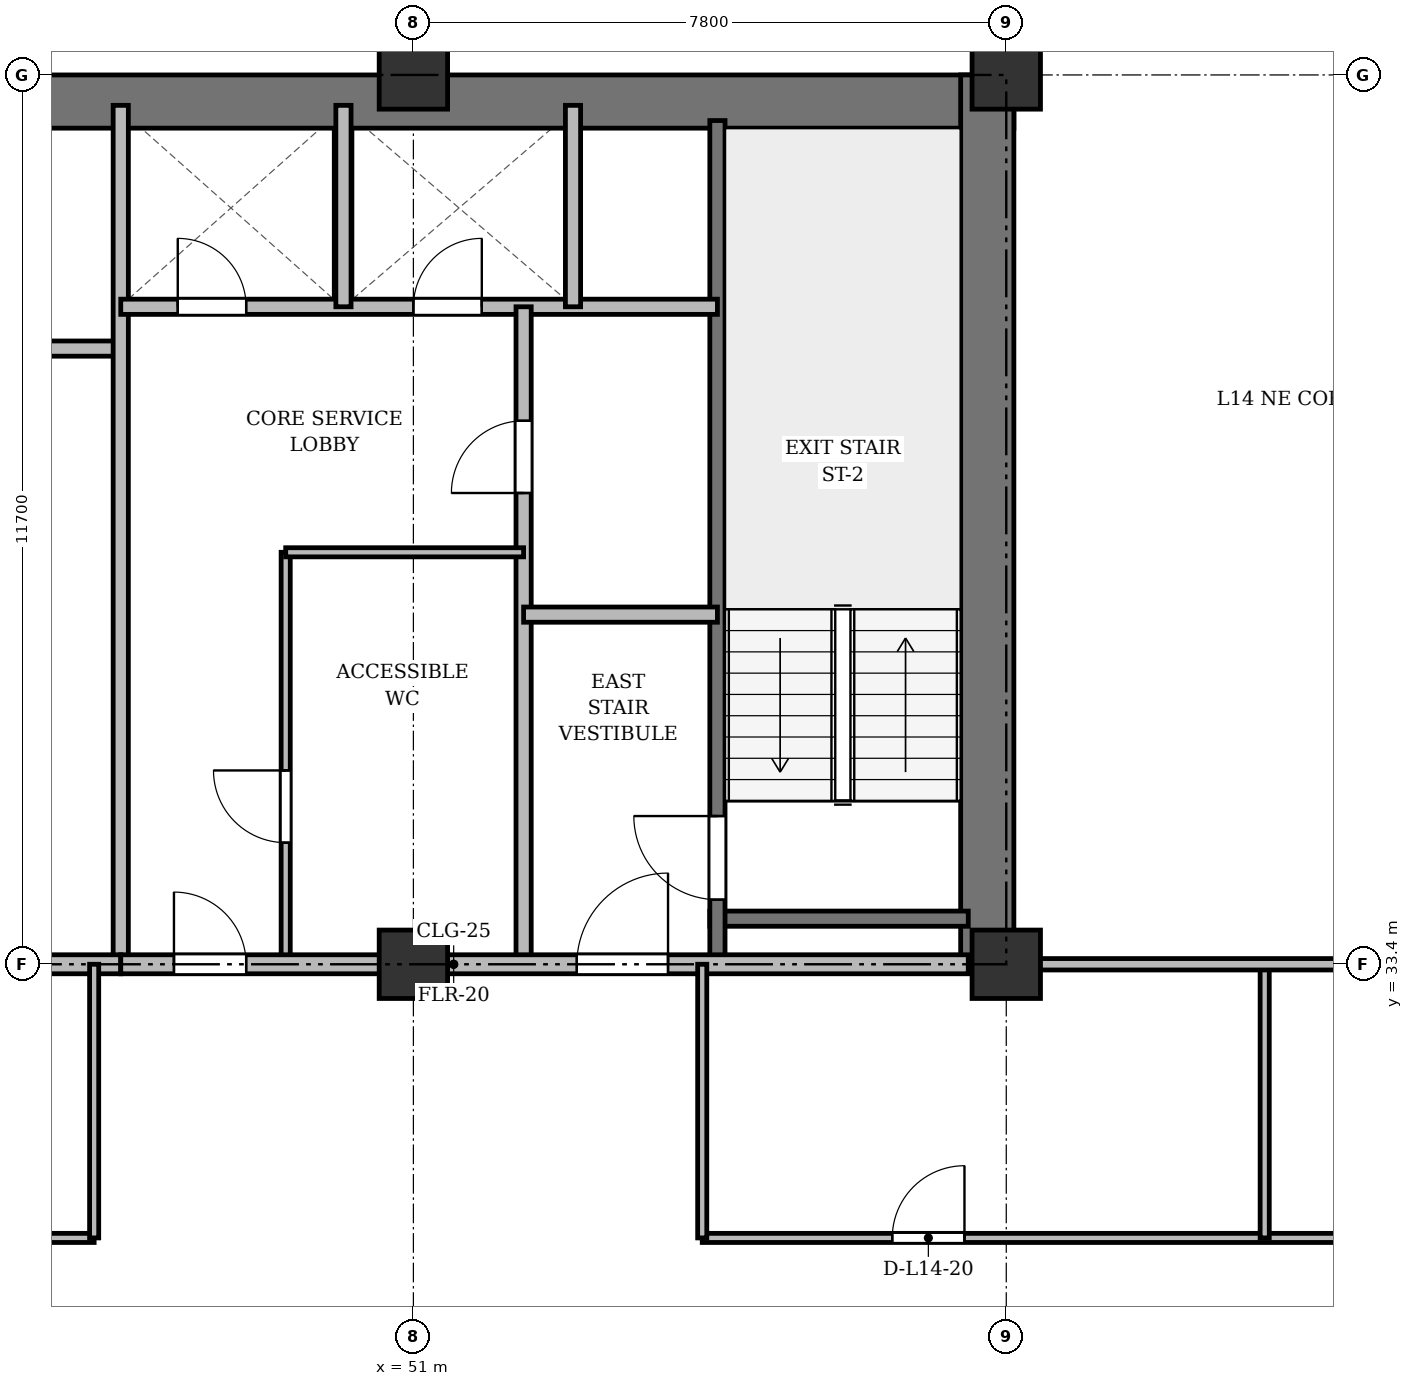
"""IFC4 building model, lengths in metres.
Left out: names, types, materials, properties, quantities, classifications, styles, units other than length and angle.
Written with IfcOpenShell. Run it as: python <this file> out.ifc"""

import sys

from ifc_helpers import new_model, si_unit, direction, frame, frame_2d, origin, origin_2d, place, context, subcontext, project, spatial, rectangle, extrude, source, transform, mapped, element, fill, save


model = new_model("IFC4")
c1 = context("Model", 3, precision=1e-05, world=origin(), true_north=direction((0.0, 1.0)))
c2 = subcontext(c1, "Body", "Model", "MODEL_VIEW")
j1 = project(units=[si_unit("LENGTHUNIT", "METRE"), si_unit("PLANEANGLEUNIT", "RADIAN")], contexts=[c1])
p1 = place(None, origin())
s1 = spatial("IfcSite", under=j1, at=p1, CompositionType="ELEMENT")
p2 = place(p1, origin())
s2 = spatial("IfcBuilding", under=s1, at=p2, CompositionType="ELEMENT")
p3 = place(p2, frame((0.0, 0.0, 55.9)))
s3 = spatial("IfcBuildingStorey", under=s2, at=p3, CompositionType="ELEMENT", Elevation=55.9)
m1 = source(origin(), c2, "Body", "SweptSolid", [
    extrude(rectangle(XDim=0.9, YDim=0.9, at=origin_2d()), origin(), (0.0, 0.0, 1.0), 3.6),
])
for number, where, z_axis, x_axis in (
    (1, (51.0, 33.4, 0.0), (0.0, 0.0, 1.0), (1.0, 0.0, 0.0)),
    (2, (51.0, 45.1, 0.0), (0.0, 0.0, 1.0), (1.0, 0.0, 0.0)),
    (3, (58.8, 33.4, 0.0), (0.0, 0.0, 1.0), (1.0, 0.0, 0.0)),
    (4, (58.8, 45.1, 0.0), (0.0, 0.0, 1.0), (1.0, 0.0, 0.0)),
):
    element("IfcColumn", number, at=place(p3, frame(where, z_axis=z_axis, x_axis=x_axis)), inside=s3, PredefinedType="COLUMN", context=c2, shape_type="MappedRepresentation", body=[
        mapped(m1, transform((0.0, 0.0, 0.0), x_axis=(1.0, 0.0, 0.0), y_axis=(0.0, 1.0, 0.0), z_axis=(0.0, 0.0, 1.0), scale=1.0)),
    ])
p4 = place(p3, frame((15.5, 44.75, 0.0), z_axis=(0.0, 0.0, 1.0), x_axis=(1.0, 0.0, 0.0)))
e5 = element("IfcWall", 5, at=p4, inside=s3, PredefinedType="SHEAR", context=c2, shape_type="SweptSolid", body=[
    extrude(rectangle(XDim=43.4, YDim=0.7, at=frame_2d((21.7, 0.0))), origin(), (0.0, 0.0, 1.0), 3.34),
])
p5 = place(p3, frame((58.55, 33.4, 0.0), z_axis=(0.0, 0.0, 1.0), x_axis=(0.0, 1.0, 0.0)))
e6 = element("IfcWall", 6, at=p5, inside=s3, PredefinedType="SHEAR", context=c2, shape_type="SweptSolid", body=[
    extrude(rectangle(XDim=11.7, YDim=0.7, at=frame_2d((5.85, 0.0))), origin(), (0.0, 0.0, 1.0), 3.34),
])
p6 = place(p3, frame((54.9, 34.0, 0.0), z_axis=(0.0, 0.0, 1.0), x_axis=(1.0, 0.0, 0.0)))
e7 = element("IfcWall", 7, at=p6, inside=s3, PredefinedType="SHEAR", context=c2, shape_type="SweptSolid", body=[
    extrude(rectangle(XDim=3.4, YDim=0.2, at=frame_2d((1.7, 0.0))), origin(), (0.0, 0.0, 1.0), 3.34),
])
p7 = place(p3, frame((55.0, 33.4, 0.0), z_axis=(0.0, 0.0, 1.0), x_axis=(0.0, 1.0, 0.0)))
e8 = element("IfcWall", 8, at=p7, inside=s3, PredefinedType="SHEAR", context=c2, shape_type="SweptSolid", body=[
    extrude(rectangle(XDim=11.1, YDim=0.2, at=frame_2d((5.55, 0.0))), origin(), (0.0, 0.0, 1.0), 3.34),
])
p8 = place(p7, frame((0.85, 0.0, 0.0)))
e9 = element("IfcOpeningElement", 9, at=p8, cuts=e8, PredefinedType="OPENING", context=c2, shape_type="SweptSolid", body=[
    extrude(rectangle(XDim=1.1, YDim=2.15, at=frame_2d((0.55, 1.075))), frame((0.0, 0.11, 0.0), z_axis=(0.0, -1.0, 0.0), x_axis=(1.0, 0.0, 0.0)), (0.0, 0.0, 1.0), 0.22),
])
p9 = place(p3, frame((40.25, 41.5, 0.0), z_axis=(0.0, 0.0, 1.0), x_axis=(1.0, 0.0, 0.0)))
e10 = element("IfcWall", 10, at=p9, inside=s3, PredefinedType="SOLIDWALL", context=c2, shape_type="SweptSolid", body=[
    extrude(rectangle(XDim=6.9, YDim=0.2, at=frame_2d((3.45, 0.0))), origin(), (0.0, 0.0, 1.0), 2.752),
])
p10 = place(p3, frame((47.15, 33.4, 0.0), z_axis=(0.0, 0.0, 1.0), x_axis=(0.0, 1.0, 0.0)))
e11 = element("IfcWall", 11, at=p10, inside=s3, PredefinedType="SOLIDWALL", context=c2, shape_type="SweptSolid", body=[
    extrude(rectangle(XDim=11.3, YDim=0.2, at=frame_2d((5.65, 0.0))), origin(), (0.0, 0.0, 1.0), 2.69),
])
p11 = place(p3, frame((26.3, 33.4, 0.0), z_axis=(0.0, 0.0, 1.0), x_axis=(1.0, 0.0, 0.0)))
e12 = element("IfcWall", 12, at=p11, inside=s3, PredefinedType="PARTITIONING", context=c2, shape_type="SweptSolid", body=[
    extrude(rectangle(XDim=20.85, YDim=0.25, at=frame_2d((10.425, 0.0))), origin(), (0.0, 0.0, 1.0), 2.69),
])
p12 = place(p11, frame((9.2, 0.0, 0.0)))
e13 = element("IfcOpeningElement", 13, at=p12, cuts=e12, PredefinedType="OPENING", context=c2, shape_type="SweptSolid", body=[
    extrude(rectangle(XDim=1.6, YDim=2.2, at=frame_2d((0.8, 1.1))), frame((0.0, 0.135, 0.0), z_axis=(0.0, -1.0, 0.0), x_axis=(1.0, 0.0, 0.0)), (0.0, 0.0, 1.0), 0.27),
])
p13 = place(p3, frame((47.15, 42.05, 0.0), z_axis=(0.0, 0.0, 1.0), x_axis=(1.0, 0.0, 0.0)))
e14 = element("IfcWall", 14, at=p13, inside=s3, PredefinedType="SOLIDWALL", context=c2, shape_type="SweptSolid", body=[
    extrude(rectangle(XDim=7.85, YDim=0.2, at=frame_2d((3.925, 0.0))), origin(), (0.0, 0.0, 1.0), 2.752),
])
p14 = place(p13, frame((0.75, 0.0, 0.0)))
e15 = element("IfcOpeningElement", 15, at=p14, cuts=e14, PredefinedType="OPENING", context=c2, shape_type="SweptSolid", body=[
    extrude(rectangle(XDim=0.9, YDim=2.1, at=frame_2d((0.45, 1.05))), frame((0.0, 0.11, 0.0), z_axis=(0.0, -1.0, 0.0), x_axis=(1.0, 0.0, 0.0)), (0.0, 0.0, 1.0), 0.22),
])
p15 = place(p13, frame((3.85, 0.0, 0.0)))
e16 = element("IfcOpeningElement", 16, at=p15, cuts=e14, PredefinedType="OPENING", context=c2, shape_type="SweptSolid", body=[
    extrude(rectangle(XDim=0.9, YDim=2.1, at=frame_2d((0.45, 1.05))), frame((0.0, 0.11, 0.0), z_axis=(0.0, -1.0, 0.0), x_axis=(1.0, 0.0, 0.0)), (0.0, 0.0, 1.0), 0.22),
])
for number, where, z_axis, x_axis in (
    (17, (50.08, 42.05, 0.0), (0.0, 0.0, 1.0), (0.0, 1.0, 0.0)),
    (18, (53.1, 42.05, 0.0), (0.0, 0.0, 1.0), (0.0, 1.0, 0.0)),
):
    element("IfcWall", number, at=place(p3, frame(where, z_axis=z_axis, x_axis=x_axis)), inside=s3, PredefinedType="SOLIDWALL", context=c2, shape_type="SweptSolid", body=[
        extrude(rectangle(XDim=2.65, YDim=0.2, at=frame_2d((1.325, 0.0))), origin(), (0.0, 0.0, 1.0), 3.34),
    ])
p16 = place(p3, frame((52.45, 33.4, 0.0), z_axis=(0.0, 0.0, 1.0), x_axis=(0.0, 1.0, 0.0)))
e19 = element("IfcWall", 19, at=p16, inside=s3, PredefinedType="PARTITIONING", context=c2, shape_type="SweptSolid", body=[
    extrude(rectangle(XDim=8.65, YDim=0.2, at=frame_2d((4.325, 0.0))), origin(), (0.0, 0.0, 1.0), 2.69),
])
p17 = place(p16, frame((6.2, 0.0, 0.0)))
e20 = element("IfcOpeningElement", 20, at=p17, cuts=e19, PredefinedType="OPENING", context=c2, shape_type="SweptSolid", body=[
    extrude(rectangle(XDim=0.95, YDim=2.15, at=frame_2d((0.475, 1.075))), frame((0.0, 0.11, 0.0), z_axis=(0.0, -1.0, 0.0), x_axis=(1.0, 0.0, 0.0)), (0.0, 0.0, 1.0), 0.22),
])
p18 = place(p3, frame((52.45, 38.0, 0.0), z_axis=(0.0, 0.0, 1.0), x_axis=(1.0, 0.0, 0.0)))
e21 = element("IfcWall", 21, at=p18, inside=s3, PredefinedType="PARTITIONING", context=c2, shape_type="SweptSolid", body=[
    extrude(rectangle(XDim=2.55, YDim=0.2, at=frame_2d((1.275, 0.0))), origin(), (0.0, 0.0, 1.0), 3.34),
])
p19 = place(p3, frame((49.32, 33.4, 0.0), z_axis=(0.0, 0.0, 1.0), x_axis=(0.0, 1.0, 0.0)))
e22 = element("IfcWall", 22, at=p19, inside=s3, PredefinedType="PARTITIONING", context=c2, shape_type="SweptSolid", body=[
    extrude(rectangle(XDim=5.42, YDim=0.12, at=frame_2d((2.71, 0.0))), origin(), (0.0, 0.0, 1.0), 2.69),
])
p20 = place(p19, frame((1.6, 0.0, 0.0)))
e23 = element("IfcOpeningElement", 23, at=p20, cuts=e22, PredefinedType="OPENING", context=c2, shape_type="SweptSolid", body=[
    extrude(rectangle(XDim=0.95, YDim=2.15, at=frame_2d((0.475, 1.075))), frame((0.0, 0.07, 0.0), z_axis=(0.0, -1.0, 0.0), x_axis=(1.0, 0.0, 0.0)), (0.0, 0.0, 1.0), 0.14),
])
p21 = place(p3, frame((49.32, 38.82, 0.0), z_axis=(0.0, 0.0, 1.0), x_axis=(1.0, 0.0, 0.0)))
e24 = element("IfcWall", 24, at=p21, inside=s3, PredefinedType="PARTITIONING", context=c2, shape_type="SweptSolid", body=[
    extrude(rectangle(XDim=3.13, YDim=0.12, at=frame_2d((1.565, 0.0))), origin(), (0.0, 0.0, 1.0), 2.752),
])
p22 = place(p3, frame((47.15, 33.4, 0.0), z_axis=(0.0, 0.0, 1.0), x_axis=(1.0, 0.0, 0.0)))
e25 = element("IfcWall", 25, at=p22, inside=s3, PredefinedType="PARTITIONING", context=c2, shape_type="SweptSolid", body=[
    extrude(rectangle(XDim=11.15, YDim=0.25, at=frame_2d((5.575, 0.0))), origin(), (0.0, 0.0, 1.0), 2.69),
])
p23 = place(p22, frame((0.7, 0.0, 0.0)))
e26 = element("IfcOpeningElement", 26, at=p23, cuts=e25, PredefinedType="OPENING", context=c2, shape_type="SweptSolid", body=[
    extrude(rectangle(XDim=0.95, YDim=2.15, at=frame_2d((0.475, 1.075))), frame((0.0, 0.135, 0.0), z_axis=(0.0, -1.0, 0.0), x_axis=(1.0, 0.0, 0.0)), (0.0, 0.0, 1.0), 0.27),
])
p24 = place(p22, frame((6.0, 0.0, 0.0)))
e27 = element("IfcOpeningElement", 27, at=p24, cuts=e25, PredefinedType="OPENING", context=c2, shape_type="SweptSolid", body=[
    extrude(rectangle(XDim=1.2, YDim=2.15, at=frame_2d((0.6, 1.075))), frame((0.0, 0.135, 0.0), z_axis=(0.0, -1.0, 0.0), x_axis=(1.0, 0.0, 0.0)), (0.0, 0.0, 1.0), 0.27),
])
p25 = place(p3, frame((38.2, 29.8, 0.0), z_axis=(0.0, 0.0, 1.0), x_axis=(1.0, 0.0, 0.0)))
e28 = element("IfcWall", 28, at=p25, inside=s3, PredefinedType="PARTITIONING", context=c2, shape_type="SweptSolid", body=[
    extrude(rectangle(XDim=8.6, YDim=0.12, at=frame_2d((4.3, 0.0))), origin(), (0.0, 0.0, 1.0), 2.752),
])
p26 = place(p25, frame((3.462, 0.0, 0.0)))
e29 = element("IfcOpeningElement", 29, at=p26, cuts=e28, PredefinedType="OPENING", context=c2, shape_type="SweptSolid", body=[
    extrude(rectangle(XDim=0.95, YDim=2.15, at=frame_2d((0.475, 1.075))), frame((0.0, 0.07, 0.0), z_axis=(0.0, -1.0, 0.0), x_axis=(1.0, 0.0, 0.0)), (0.0, 0.0, 1.0), 0.14),
])
p27 = place(p3, frame((54.8, 29.8, 0.0), z_axis=(0.0, 0.0, 1.0), x_axis=(1.0, 0.0, 0.0)))
e30 = element("IfcWall", 30, at=p27, inside=s3, PredefinedType="PARTITIONING", context=c2, shape_type="SweptSolid", body=[
    extrude(rectangle(XDim=14.85, YDim=0.12, at=frame_2d((7.425, 0.0))), origin(), (0.0, 0.0, 1.0), 2.752),
])
p28 = place(p27, frame((2.5, 0.0, 0.0)))
e31 = element("IfcOpeningElement", 31, at=p28, cuts=e30, PredefinedType="OPENING", context=c2, shape_type="SweptSolid", body=[
    extrude(rectangle(XDim=0.95, YDim=2.15, at=frame_2d((0.475, 1.075))), frame((0.0, 0.07, 0.0), z_axis=(0.0, -1.0, 0.0), x_axis=(1.0, 0.0, 0.0)), (0.0, 0.0, 1.0), 0.14),
])
p29 = place(p27, frame((9.2, 0.0, 0.0)))
e32 = element("IfcOpeningElement", 32, at=p29, cuts=e30, PredefinedType="OPENING", context=c2, shape_type="SweptSolid", body=[
    extrude(rectangle(XDim=0.95, YDim=2.15, at=frame_2d((0.475, 1.075))), frame((0.0, 0.07, 0.0), z_axis=(0.0, -1.0, 0.0), x_axis=(1.0, 0.0, 0.0)), (0.0, 0.0, 1.0), 0.14),
])
for number, where, z_axis, x_axis in (
    (33, (62.2, 29.8, 0.0), (0.0, 0.0, 1.0), (0.0, 1.0, 0.0)),
    (34, (46.8, 29.8, 0.0), (0.0, 0.0, 1.0), (0.0, 1.0, 0.0)),
    (35, (54.8, 29.8, 0.0), (0.0, 0.0, 1.0), (0.0, 1.0, 0.0)),
):
    element("IfcWall", number, at=place(p3, frame(where, z_axis=z_axis, x_axis=x_axis)), inside=s3, PredefinedType="PARTITIONING", context=c2, shape_type="SweptSolid", body=[
        extrude(rectangle(XDim=3.6, YDim=0.12, at=frame_2d((1.8, 0.0))), origin(), (0.0, 0.0, 1.0), 2.69),
    ])
p30 = place(p3, frame((58.8, 33.4, 0.0), z_axis=(0.0, 0.0, 1.0), x_axis=(1.0, 0.0, 0.0)))
e36 = element("IfcWall", 36, at=p30, inside=s3, PredefinedType="PARTITIONING", context=c2, shape_type="SweptSolid", body=[
    extrude(rectangle(XDim=10.85, YDim=0.15, at=frame_2d((5.425, 0.0))), origin(), (0.0, 0.0, 1.0), 2.69),
])
p31 = place(p30, frame((4.76, 0.0, 0.0)))
e37 = element("IfcOpeningElement", 37, at=p31, cuts=e36, PredefinedType="OPENING", context=c2, shape_type="SweptSolid", body=[
    extrude(rectangle(XDim=0.95, YDim=2.15, at=frame_2d((0.475, 1.075))), frame((0.0, 0.085, 0.0), z_axis=(0.0, -1.0, 0.0), x_axis=(1.0, 0.0, 0.0)), (0.0, 0.0, 1.0), 0.17),
])
p32 = place(p3, frame((58.8, 44.75, 0.0), z_axis=(0.0, 0.0, 1.0), x_axis=(0.0, 1.0, 0.0)))
e38 = element("IfcWall", 38, at=p32, inside=s3, PredefinedType="PARTITIONING", context=c2, shape_type="SweptSolid", body=[
    extrude(rectangle(XDim=3.61, YDim=0.15, at=frame_2d((1.805, 0.0))), origin(), (0.0, 0.0, 1.0), 2.752),
])
p33 = place(p32, frame((1.1, 0.0, 0.0)))
e39 = element("IfcOpeningElement", 39, at=p33, cuts=e38, PredefinedType="OPENING", context=c2, shape_type="SweptSolid", body=[
    extrude(rectangle(XDim=0.95, YDim=2.15, at=frame_2d((0.475, 1.075))), frame((0.0, 0.085, 0.0), z_axis=(0.0, -1.0, 0.0), x_axis=(1.0, 0.0, 0.0)), (0.0, 0.0, 1.0), 0.17),
])
m2 = source(origin(), c2, "Body", "SweptSolid", [
    extrude(rectangle(XDim=1.1, YDim=2.15, at=frame_2d((0.55, 1.075))), frame((0.0, 0.025, 0.0), z_axis=(0.0, -1.0, 0.0), x_axis=(1.0, 0.0, 0.0)), (0.0, 0.0, 1.0), 0.05),
])
p34 = place(p8, origin())
e40 = element("IfcDoor", 40, at=p34, inside=s3, OperationType="SINGLE_SWING_RIGHT", PredefinedType="DOOR", context=c2, shape_type="MappedRepresentation", body=[
    mapped(m2, transform((0.0, 0.0, 0.0), x_axis=(1.0, 0.0, 0.0), y_axis=(0.0, 1.0, 0.0), z_axis=(0.0, 0.0, 1.0), scale=1.0)),
])
fill(e9, e40)
m3 = source(origin(), c2, "Body", "SweptSolid", [
    extrude(rectangle(XDim=0.9, YDim=2.1, at=frame_2d((0.45, 1.05))), frame((0.0, 0.025, 0.0), z_axis=(0.0, -1.0, 0.0), x_axis=(1.0, 0.0, 0.0)), (0.0, 0.0, 1.0), 0.05),
])
p35 = place(p14, origin())
e41 = element("IfcDoor", 41, at=p35, inside=s3, OperationType="SINGLE_SWING_LEFT", PredefinedType="DOOR", context=c2, shape_type="MappedRepresentation", body=[
    mapped(m3, transform((0.0, 0.0, 0.0), x_axis=(1.0, 0.0, 0.0), y_axis=(0.0, 1.0, 0.0), z_axis=(0.0, 0.0, 1.0), scale=1.0)),
])
fill(e15, e41)
p36 = place(p15, origin())
e42 = element("IfcDoor", 42, at=p36, inside=s3, OperationType="SINGLE_SWING_RIGHT", PredefinedType="DOOR", context=c2, shape_type="MappedRepresentation", body=[
    mapped(m3, transform((0.0, 0.0, 0.0), x_axis=(1.0, 0.0, 0.0), y_axis=(0.0, 1.0, 0.0), z_axis=(0.0, 0.0, 1.0), scale=1.0)),
])
fill(e16, e42)
m4 = source(origin(), c2, "Body", "SweptSolid", [
    extrude(rectangle(XDim=0.95, YDim=2.15, at=frame_2d((0.475, 1.075))), frame((0.0, 0.025, 0.0), z_axis=(0.0, -1.0, 0.0), x_axis=(1.0, 0.0, 0.0)), (0.0, 0.0, 1.0), 0.05),
])
p37 = place(p17, origin())
e43 = element("IfcDoor", 43, at=p37, inside=s3, OperationType="SINGLE_SWING_LEFT", PredefinedType="DOOR", context=c2, shape_type="MappedRepresentation", body=[
    mapped(m4, transform((0.0, 0.0, 0.0), x_axis=(1.0, 0.0, 0.0), y_axis=(0.0, 1.0, 0.0), z_axis=(0.0, 0.0, 1.0), scale=1.0)),
])
fill(e20, e43)
p38 = place(p20, origin())
e44 = element("IfcDoor", 44, at=p38, inside=s3, OperationType="SINGLE_SWING_RIGHT", PredefinedType="DOOR", context=c2, shape_type="MappedRepresentation", body=[
    mapped(m4, transform((0.0, 0.0, 0.0), x_axis=(1.0, 0.0, 0.0), y_axis=(0.0, 1.0, 0.0), z_axis=(0.0, 0.0, 1.0), scale=1.0)),
])
fill(e23, e44)
p39 = place(p23, origin())
e45 = element("IfcDoor", 45, at=p39, inside=s3, OperationType="SINGLE_SWING_LEFT", PredefinedType="DOOR", context=c2, shape_type="MappedRepresentation", body=[
    mapped(m4, transform((0.0, 0.0, 0.0), x_axis=(1.0, 0.0, 0.0), y_axis=(0.0, 1.0, 0.0), z_axis=(0.0, 0.0, 1.0), scale=1.0)),
])
fill(e26, e45)
m5 = source(origin(), c2, "Body", "SweptSolid", [
    extrude(rectangle(XDim=1.2, YDim=2.15, at=frame_2d((0.6, 1.075))), frame((0.0, 0.025, 0.0), z_axis=(0.0, -1.0, 0.0), x_axis=(1.0, 0.0, 0.0)), (0.0, 0.0, 1.0), 0.05),
])
p40 = place(p24, origin())
e46 = element("IfcDoor", 46, at=p40, inside=s3, OperationType="SINGLE_SWING_RIGHT", PredefinedType="DOOR", context=c2, shape_type="MappedRepresentation", body=[
    mapped(m5, transform((0.0, 0.0, 0.0), x_axis=(1.0, 0.0, 0.0), y_axis=(0.0, 1.0, 0.0), z_axis=(0.0, 0.0, 1.0), scale=1.0)),
])
fill(e27, e46)
p41 = place(p28, origin())
e47 = element("IfcDoor", 47, at=p41, inside=s3, OperationType="SINGLE_SWING_RIGHT", PredefinedType="DOOR", context=c2, shape_type="MappedRepresentation", body=[
    mapped(m4, transform((0.0, 0.0, 0.0), x_axis=(1.0, 0.0, 0.0), y_axis=(0.0, 1.0, 0.0), z_axis=(0.0, 0.0, 1.0), scale=1.0)),
])
fill(e31, e47)
save(model, sys.argv[1])
